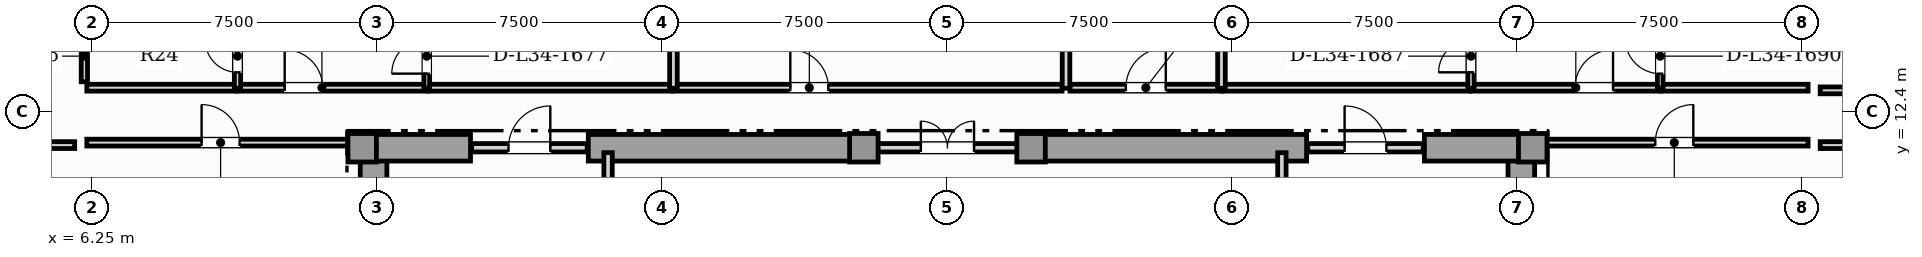
"""IFC4 building model, lengths in metres.
Left out: names, types, materials, properties, quantities, classifications, styles, units other than length and angle.
Written with IfcOpenShell. Run it as: python <this file> out.ifc"""

import sys

from ifc_helpers import new_model, si_unit, direction, frame, frame_2d, origin, origin_2d, place, context, subcontext, project, spatial, rectangle, extrude, element, fill, save


model = new_model("IFC4")
c1 = context("Model", 3, precision=1e-05, world=origin(), true_north=direction((0.0, 1.0)))
c2 = subcontext(c1, "Body", "Model", "MODEL_VIEW")
j1 = project(units=[si_unit("LENGTHUNIT", "METRE"), si_unit("PLANEANGLEUNIT", "RADIAN")], contexts=[c1])
p1 = place(None, origin())
s1 = spatial("IfcSite", under=j1, at=p1, CompositionType="ELEMENT")
p2 = place(p1, origin())
s2 = spatial("IfcBuilding", under=s1, at=p2, CompositionType="ELEMENT")
p3 = place(p2, frame((0.0, 0.0, 140.15)))
s3 = spatial("IfcBuildingStorey", under=s2, at=p3, CompositionType="ELEMENT", Elevation=140.15)
for number, where, z_axis, x_axis in (
    (1, (13.65, 0.92, 0.0), (0.0, 0.0, 1.0), (0.0, 1.0, 0.0)),
    (2, (43.85, 0.92, 0.0), (0.0, 0.0, 1.0), (0.0, 1.0, 0.0)),
):
    element("IfcWall", number, at=place(p3, frame(where, z_axis=z_axis, x_axis=x_axis)), inside=s3, PredefinedType="SHEAR", context=c2, shape_type="SweptSolid", body=[
        extrude(rectangle(XDim=10.53, YDim=0.7, at=frame_2d((5.265, 0.0))), origin(), (0.0, 0.0, 1.0), 4.83),
    ])
p4 = place(p3, frame((13.25, 11.45, 0.0), z_axis=(0.0, 0.0, 1.0), x_axis=(1.0, 0.0, 0.0)))
e3 = element("IfcWall", 3, at=p4, inside=s3, PredefinedType="SHEAR", context=c2, shape_type="SweptSolid", body=[
    extrude(rectangle(XDim=2.95, YDim=0.7, at=frame_2d((1.475, 0.0))), origin(), (0.0, 0.0, 1.0), 4.83),
])
for number, where, z_axis, x_axis in (
    (4, (19.3, 11.45, 0.0), (0.0, 0.0, 1.0), (1.0, 0.0, 0.0)),
    (5, (30.9, 11.45, 0.0), (0.0, 0.0, 1.0), (1.0, 0.0, 0.0)),
):
    element("IfcWall", number, at=place(p3, frame(where, z_axis=z_axis, x_axis=x_axis)), inside=s3, PredefinedType="SHEAR", context=c2, shape_type="SweptSolid", body=[
        extrude(rectangle(XDim=7.3, YDim=0.7, at=frame_2d((3.65, 0.0))), origin(), (0.0, 0.0, 1.0), 4.83),
    ])
p5 = place(p3, frame((41.3, 11.45, 0.0), z_axis=(0.0, 0.0, 1.0), x_axis=(1.0, 0.0, 0.0)))
e6 = element("IfcWall", 6, at=p5, inside=s3, PredefinedType="SHEAR", context=c2, shape_type="SweptSolid", body=[
    extrude(rectangle(XDim=2.95, YDim=0.7, at=frame_2d((1.475, 0.0))), origin(), (0.0, 0.0, 1.0), 4.83),
])
for number, where, z_axis, x_axis in (
    (7, (13.35, 11.45, 0.0), (0.0, 0.0, 1.0), (1.0, 0.0, 0.0)),
    (8, (44.15, 11.45, 0.0), (0.0, 0.0, 1.0), (1.0, 0.0, 0.0)),
    (9, (26.55, 11.45, 0.0), (0.0, 0.0, 1.0), (1.0, 0.0, 0.0)),
    (10, (30.95, 11.45, 0.0), (0.0, 0.0, 1.0), (1.0, 0.0, 0.0)),
):
    element("IfcColumn", number, at=place(p3, frame(where, z_axis=z_axis, x_axis=x_axis)), inside=s3, PredefinedType="COLUMN", context=c2, shape_type="SweptSolid", body=[
        extrude(rectangle(XDim=0.75, YDim=0.75, at=origin_2d()), origin(), (0.0, 0.0, 1.0), 5.05),
    ])
p6 = place(p3, frame((19.82, 8.52, 0.0), z_axis=(0.0, 0.0, 1.0), x_axis=(0.0, 1.0, 0.0)))
e11 = element("IfcWall", 11, at=p6, inside=s3, PredefinedType="SOLIDWALL", context=c2, shape_type="SweptSolid", body=[
    extrude(rectangle(XDim=2.8, YDim=0.22, at=frame_2d((1.4, 0.0))), origin(), (0.0, 0.0, 1.0), 4.286),
])
p7 = place(p6, frame((0.85, 0.0, 0.0)))
e12 = element("IfcOpeningElement", 12, at=p7, cuts=e11, PredefinedType="OPENING", context=c2, shape_type="SweptSolid", body=[
    extrude(rectangle(XDim=1.1, YDim=2.2, at=frame_2d((0.55, 1.1))), frame((0.0, 0.12, 0.0), z_axis=(0.0, -1.0, 0.0), x_axis=(1.0, 0.0, 0.0)), (0.0, 0.0, 1.0), 0.24),
])
p8 = place(p3, frame((37.55, 8.52, 0.0), z_axis=(0.0, 0.0, 1.0), x_axis=(0.0, 1.0, 0.0)))
e13 = element("IfcWall", 13, at=p8, inside=s3, PredefinedType="SOLIDWALL", context=c2, shape_type="SweptSolid", body=[
    extrude(rectangle(XDim=2.8, YDim=0.22, at=frame_2d((1.4, 0.0))), origin(), (0.0, 0.0, 1.0), 4.286),
])
p9 = place(p8, frame((0.85, 0.0, 0.0)))
e14 = element("IfcOpeningElement", 14, at=p9, cuts=e13, PredefinedType="OPENING", context=c2, shape_type="SweptSolid", body=[
    extrude(rectangle(XDim=1.1, YDim=2.2, at=frame_2d((0.55, 1.1))), frame((0.0, 0.12, 0.0), z_axis=(0.0, -1.0, 0.0), x_axis=(1.0, 0.0, 0.0)), (0.0, 0.0, 1.0), 0.24),
])
p10 = place(p3, frame((16.23, 11.45, 0.0), z_axis=(0.0, 0.0, 1.0), x_axis=(1.0, 0.0, 0.0)))
e15 = element("IfcWall", 15, at=p10, inside=s3, PredefinedType="SOLIDWALL", context=c2, shape_type="SweptSolid", body=[
    extrude(rectangle(XDim=3.04, YDim=0.22, at=frame_2d((1.52, 0.0))), origin(), (0.0, 0.0, 1.0), 4.83),
])
p11 = place(p10, frame((0.97, 0.0, 0.0)))
e16 = element("IfcOpeningElement", 16, at=p11, cuts=e15, PredefinedType="OPENING", context=c2, shape_type="SweptSolid", body=[
    extrude(rectangle(XDim=1.1, YDim=2.2, at=frame_2d((0.55, 1.1))), frame((0.0, 0.12, 0.0), z_axis=(0.0, -1.0, 0.0), x_axis=(1.0, 0.0, 0.0)), (0.0, 0.0, 1.0), 0.24),
])
p12 = place(p3, frame((26.63, 11.45, 0.0), z_axis=(0.0, 0.0, 1.0), x_axis=(1.0, 0.0, 0.0)))
e17 = element("IfcWall", 17, at=p12, inside=s3, PredefinedType="SOLIDWALL", context=c2, shape_type="SweptSolid", body=[
    extrude(rectangle(XDim=4.24, YDim=0.22, at=frame_2d((2.12, 0.0))), origin(), (0.0, 0.0, 1.0), 4.83),
])
p13 = place(p12, frame((1.42, 0.0, 0.0)))
e18 = element("IfcOpeningElement", 18, at=p13, cuts=e17, PredefinedType="OPENING", context=c2, shape_type="SweptSolid", body=[
    extrude(rectangle(XDim=1.4, YDim=2.2, at=frame_2d((0.7, 1.1))), frame((0.0, 0.12, 0.0), z_axis=(0.0, -1.0, 0.0), x_axis=(1.0, 0.0, 0.0)), (0.0, 0.0, 1.0), 0.24),
])
p14 = place(p3, frame((38.23, 11.45, 0.0), z_axis=(0.0, 0.0, 1.0), x_axis=(1.0, 0.0, 0.0)))
e19 = element("IfcWall", 19, at=p14, inside=s3, PredefinedType="SOLIDWALL", context=c2, shape_type="SweptSolid", body=[
    extrude(rectangle(XDim=3.04, YDim=0.22, at=frame_2d((1.52, 0.0))), origin(), (0.0, 0.0, 1.0), 4.83),
])
p15 = place(p14, frame((0.97, 0.0, 0.0)))
e20 = element("IfcOpeningElement", 20, at=p15, cuts=e19, PredefinedType="OPENING", context=c2, shape_type="SweptSolid", body=[
    extrude(rectangle(XDim=1.1, YDim=2.2, at=frame_2d((0.55, 1.1))), frame((0.0, 0.12, 0.0), z_axis=(0.0, -1.0, 0.0), x_axis=(1.0, 0.0, 0.0)), (0.0, 0.0, 1.0), 0.24),
])
p16 = place(p3, frame((6.105, 11.585, 0.0), z_axis=(0.0, 0.0, 1.0), x_axis=(1.0, 0.0, 0.0)))
e21 = element("IfcWall", 21, at=p16, inside=s3, PredefinedType="PARTITIONING", context=c2, shape_type="SweptSolid", body=[
    extrude(rectangle(XDim=7.04, YDim=0.18, at=frame_2d((3.52, 0.0))), origin(), (0.0, 0.0, 1.0), 4.83),
])
p17 = place(p16, frame((3.02, 0.0, 0.0)))
e22 = element("IfcOpeningElement", 22, at=p17, cuts=e21, PredefinedType="OPENING", context=c2, shape_type="SweptSolid", body=[
    extrude(rectangle(XDim=1.0, YDim=2.15, at=frame_2d((0.5, 1.075))), frame((0.0, 0.1, 0.0), z_axis=(0.0, -1.0, 0.0), x_axis=(1.0, 0.0, 0.0)), (0.0, 0.0, 1.0), 0.2),
])
p18 = place(p3, frame((44.355, 11.585, 0.0), z_axis=(0.0, 0.0, 1.0), x_axis=(1.0, 0.0, 0.0)))
e23 = element("IfcWall", 23, at=p18, inside=s3, PredefinedType="PARTITIONING", context=c2, shape_type="SweptSolid", body=[
    extrude(rectangle(XDim=7.04, YDim=0.18, at=frame_2d((3.52, 0.0))), origin(), (0.0, 0.0, 1.0), 4.83),
])
p19 = place(p18, frame((3.02, 0.0, 0.0)))
e24 = element("IfcOpeningElement", 24, at=p19, cuts=e23, PredefinedType="OPENING", context=c2, shape_type="SweptSolid", body=[
    extrude(rectangle(XDim=1.0, YDim=2.15, at=frame_2d((0.5, 1.075))), frame((0.0, 0.1, 0.0), z_axis=(0.0, -1.0, 0.0), x_axis=(1.0, 0.0, 0.0)), (0.0, 0.0, 1.0), 0.2),
])
p20 = place(p3, frame((21.535, 13.03, 0.0), z_axis=(0.0, 0.0, 1.0), x_axis=(1.0, 0.0, 0.0)))
e25 = element("IfcWall", 25, at=p20, inside=s3, PredefinedType="PARTITIONING", context=c2, shape_type="SweptSolid", body=[
    extrude(rectangle(XDim=10.23, YDim=0.18, at=frame_2d((5.115, 0.0))), origin(), (0.0, 0.0, 1.0), 4.83),
])
p21 = place(p20, frame((3.081, 0.0, 0.0)))
e26 = element("IfcOpeningElement", 26, at=p21, cuts=e25, PredefinedType="OPENING", context=c2, shape_type="SweptSolid", body=[
    extrude(rectangle(XDim=1.0, YDim=2.15, at=frame_2d((0.5, 1.075))), frame((0.0, 0.1, 0.0), z_axis=(0.0, -1.0, 0.0), x_axis=(1.0, 0.0, 0.0)), (0.0, 0.0, 1.0), 0.2),
])
p22 = place(p3, frame((31.975, 13.03, 0.0), z_axis=(0.0, 0.0, 1.0), x_axis=(1.0, 0.0, 0.0)))
e27 = element("IfcWall", 27, at=p22, inside=s3, PredefinedType="PARTITIONING", context=c2, shape_type="SweptSolid", body=[
    extrude(rectangle(XDim=3.99, YDim=0.18, at=frame_2d((1.995, 0.0))), origin(), (0.0, 0.0, 1.0), 4.83),
])
p23 = place(p22, frame((1.47, 0.0, 0.0)))
e28 = element("IfcOpeningElement", 28, at=p23, cuts=e27, PredefinedType="OPENING", context=c2, shape_type="SweptSolid", body=[
    extrude(rectangle(XDim=1.05, YDim=2.15, at=frame_2d((0.525, 1.075))), frame((0.0, 0.1, 0.0), z_axis=(0.0, -1.0, 0.0), x_axis=(1.0, 0.0, 0.0)), (0.0, 0.0, 1.0), 0.2),
])
p24 = place(p3, frame((10.065, 13.03, 0.0), z_axis=(0.0, 0.0, 1.0), x_axis=(1.0, 0.0, 0.0)))
e29 = element("IfcWall", 29, at=p24, inside=s3, PredefinedType="PARTITIONING", context=c2, shape_type="SweptSolid", body=[
    extrude(rectangle(XDim=4.99, YDim=0.18, at=frame_2d((2.495, 0.0))), origin(), (0.0, 0.0, 1.0), 4.83),
])
p25 = place(p24, frame((1.247, 0.0, 0.0)))
e30 = element("IfcOpeningElement", 30, at=p25, cuts=e29, PredefinedType="OPENING", context=c2, shape_type="SweptSolid", body=[
    extrude(rectangle(XDim=1.0, YDim=2.15, at=frame_2d((0.5, 1.075))), frame((0.0, 0.1, 0.0), z_axis=(0.0, -1.0, 0.0), x_axis=(1.0, 0.0, 0.0)), (0.0, 0.0, 1.0), 0.2),
])
p26 = place(p3, frame((6.105, 13.03, 0.0), z_axis=(0.0, 0.0, 1.0), x_axis=(1.0, 0.0, 0.0)))
e31 = element("IfcWall", 31, at=p26, inside=s3, PredefinedType="PARTITIONING", context=c2, shape_type="SweptSolid", body=[
    extrude(rectangle(XDim=3.93, YDim=0.18, at=frame_2d((1.965, 0.0))), origin(), (0.0, 0.0, 1.0), 4.83),
])
p27 = place(p3, frame((15.085, 13.03, 0.0), z_axis=(0.0, 0.0, 1.0), x_axis=(1.0, 0.0, 0.0)))
e32 = element("IfcWall", 32, at=p27, inside=s3, PredefinedType="PARTITIONING", context=c2, shape_type="SweptSolid", body=[
    extrude(rectangle(XDim=6.42, YDim=0.18, at=frame_2d((3.21, 0.0))), origin(), (0.0, 0.0, 1.0), 4.83),
])
p28 = place(p3, frame((42.52, 13.03, 0.0), z_axis=(0.0, 0.0, 1.0), x_axis=(1.0, 0.0, 0.0)))
e33 = element("IfcWall", 33, at=p28, inside=s3, PredefinedType="PARTITIONING", context=c2, shape_type="SweptSolid", body=[
    extrude(rectangle(XDim=4.99, YDim=0.18, at=frame_2d((2.495, 0.0))), origin(), (0.0, 0.0, 1.0), 4.83),
])
p29 = place(p28, frame((2.743, 0.0, 0.0)))
e34 = element("IfcOpeningElement", 34, at=p29, cuts=e33, PredefinedType="OPENING", context=c2, shape_type="SweptSolid", body=[
    extrude(rectangle(XDim=1.0, YDim=2.15, at=frame_2d((0.5, 1.075))), frame((0.0, 0.1, 0.0), z_axis=(0.0, -1.0, 0.0), x_axis=(1.0, 0.0, 0.0)), (0.0, 0.0, 1.0), 0.2),
])
p30 = place(p3, frame((35.995, 13.03, 0.0), z_axis=(0.0, 0.0, 1.0), x_axis=(1.0, 0.0, 0.0)))
e35 = element("IfcWall", 35, at=p30, inside=s3, PredefinedType="PARTITIONING", context=c2, shape_type="SweptSolid", body=[
    extrude(rectangle(XDim=6.495, YDim=0.18, at=frame_2d((3.248, 0.0))), origin(), (0.0, 0.0, 1.0), 4.83),
])
p31 = place(p3, frame((47.54, 13.03, 0.0), z_axis=(0.0, 0.0, 1.0), x_axis=(1.0, 0.0, 0.0)))
e36 = element("IfcWall", 36, at=p31, inside=s3, PredefinedType="PARTITIONING", context=c2, shape_type="SweptSolid", body=[
    extrude(rectangle(XDim=3.855, YDim=0.18, at=frame_2d((1.927, 0.0))), origin(), (0.0, 0.0, 1.0), 4.83),
])
p32 = place(p3, frame((31.87, 13.015, 0.0), z_axis=(0.0, 0.0, 1.0), x_axis=(0.0, 1.0, 0.0)))
e37 = element("IfcWall", 37, at=p32, inside=s3, PredefinedType="PARTITIONING", context=c2, shape_type="SweptSolid", body=[
    extrude(rectangle(XDim=4.54, YDim=0.2, at=frame_2d((2.27, 0.0))), origin(), (0.0, 0.0, 1.0), 4.83),
])
for number, where, z_axis, x_axis in (
    (38, (21.54, 13.015, 0.0), (0.0, 0.0, 1.0), (0.0, 1.0, 0.0)),
    (39, (35.96, 13.015, 0.0), (0.0, 0.0, 1.0), (0.0, 1.0, 0.0)),
):
    element("IfcWall", number, at=place(p3, frame(where, z_axis=z_axis, x_axis=x_axis)), inside=s3, PredefinedType="PARTITIONING", context=c2, shape_type="SweptSolid", body=[
        extrude(rectangle(XDim=1.69, YDim=0.2, at=frame_2d((0.845, 0.0))), origin(), (0.0, 0.0, 1.0), 4.83),
    ])
p33 = place(p3, frame((10.07, 13.015, 0.0), z_axis=(0.0, 0.0, 1.0), x_axis=(0.0, 1.0, 0.0)))
e40 = element("IfcWall", 40, at=p33, inside=s3, PredefinedType="PLUMBINGWALL", context=c2, shape_type="SweptSolid", body=[
    extrude(rectangle(XDim=1.69, YDim=0.165, at=frame_2d((0.845, 0.0))), origin(), (0.0, 0.0, 1.0), 4.377),
])
p34 = place(p33, frame((0.42, 0.0, 0.0)))
e41 = element("IfcOpeningElement", 41, at=p34, cuts=e40, PredefinedType="OPENING", context=c2, shape_type="SweptSolid", body=[
    extrude(rectangle(XDim=0.85, YDim=2.1, at=frame_2d((0.425, 1.05))), frame((0.0, 0.093, 0.0), z_axis=(0.0, -1.0, 0.0), x_axis=(1.0, 0.0, 0.0)), (0.0, 0.0, 1.0), 0.185),
])
p35 = place(p3, frame((15.05, 13.015, 0.0), z_axis=(0.0, 0.0, 1.0), x_axis=(0.0, 1.0, 0.0)))
e42 = element("IfcWall", 42, at=p35, inside=s3, PredefinedType="PARTITIONING", context=c2, shape_type="SweptSolid", body=[
    extrude(rectangle(XDim=1.69, YDim=0.15, at=frame_2d((0.845, 0.0))), origin(), (0.0, 0.0, 1.0), 4.83),
])
p36 = place(p35, frame((0.385, 0.0, 0.0)))
e43 = element("IfcOpeningElement", 43, at=p36, cuts=e42, PredefinedType="OPENING", context=c2, shape_type="SweptSolid", body=[
    extrude(rectangle(XDim=0.92, YDim=2.1, at=frame_2d((0.46, 1.05))), frame((0.0, 0.085, 0.0), z_axis=(0.0, -1.0, 0.0), x_axis=(1.0, 0.0, 0.0)), (0.0, 0.0, 1.0), 0.17),
])
p37 = place(p3, frame((42.525, 13.015, 0.0), z_axis=(0.0, 0.0, 1.0), x_axis=(0.0, 1.0, 0.0)))
e44 = element("IfcWall", 44, at=p37, inside=s3, PredefinedType="PLUMBINGWALL", context=c2, shape_type="SweptSolid", body=[
    extrude(rectangle(XDim=1.69, YDim=0.165, at=frame_2d((0.845, 0.0))), origin(), (0.0, 0.0, 1.0), 4.83),
])
p38 = place(p37, frame((0.42, 0.0, 0.0)))
e45 = element("IfcOpeningElement", 45, at=p38, cuts=e44, PredefinedType="OPENING", context=c2, shape_type="SweptSolid", body=[
    extrude(rectangle(XDim=0.85, YDim=2.1, at=frame_2d((0.425, 1.05))), frame((0.0, 0.093, 0.0), z_axis=(0.0, -1.0, 0.0), x_axis=(1.0, 0.0, 0.0)), (0.0, 0.0, 1.0), 0.185),
])
p39 = place(p3, frame((47.505, 13.015, 0.0), z_axis=(0.0, 0.0, 1.0), x_axis=(0.0, 1.0, 0.0)))
e46 = element("IfcWall", 46, at=p39, inside=s3, PredefinedType="PARTITIONING", context=c2, shape_type="SweptSolid", body=[
    extrude(rectangle(XDim=1.69, YDim=0.15, at=frame_2d((0.845, 0.0))), origin(), (0.0, 0.0, 1.0), 4.377),
])
p40 = place(p39, frame((0.385, 0.0, 0.0)))
e47 = element("IfcOpeningElement", 47, at=p40, cuts=e46, PredefinedType="OPENING", context=c2, shape_type="SweptSolid", body=[
    extrude(rectangle(XDim=0.92, YDim=2.1, at=frame_2d((0.46, 1.05))), frame((0.0, 0.085, 0.0), z_axis=(0.0, -1.0, 0.0), x_axis=(1.0, 0.0, 0.0)), (0.0, 0.0, 1.0), 0.17),
])
for number, where, z_axis, x_axis in (
    (48, (2.772, 11.52, 0.0), (0.0, 0.0, 1.0), (1.0, 0.0, 0.0)),
    (49, (51.714, 11.52, 0.0), (0.0, 0.0, 1.0), (1.0, 0.0, 0.0)),
):
    element("IfcWall", number, at=place(p3, frame(where, z_axis=z_axis, x_axis=x_axis)), inside=s3, PredefinedType="PARTITIONING", context=c2, shape_type="SweptSolid", body=[
        extrude(rectangle(XDim=3.013, YDim=0.18, at=frame_2d((1.507, 0.0))), origin(), (0.0, 0.0, 1.0), 4.83),
    ])
p41 = place(p3, frame((6.04, 13.186, 0.0), z_axis=(0.0, 0.0, 1.0), x_axis=(0.0, 1.0, 0.0)))
e50 = element("IfcWall", 50, at=p41, inside=s3, PredefinedType="PLUMBINGWALL", context=c2, shape_type="SweptSolid", body=[
    extrude(rectangle(XDim=1.349, YDim=0.165, at=frame_2d((0.674, 0.0))), origin(), (0.0, 0.0, 1.0), 4.83),
])
p42 = place(p3, frame((54.728, 12.96, 0.0), z_axis=(0.0, 0.0, 1.0), x_axis=(-1.0, 0.0, 0.0)))
e51 = element("IfcWall", 51, at=p42, inside=s3, PredefinedType="PARTITIONING", context=c2, shape_type="SweptSolid", body=[
    extrude(rectangle(XDim=3.014, YDim=0.18, at=frame_2d((1.507, 0.0))), origin(), (0.0, 0.0, 1.0), 4.83),
])
p43 = place(p11, origin())
e52 = element("IfcDoor", 52, at=p43, inside=s3, OperationType="SINGLE_SWING_RIGHT", PredefinedType="DOOR", context=c2, shape_type="SweptSolid", body=[
    extrude(rectangle(XDim=1.1, YDim=2.2, at=frame_2d((0.55, 1.1))), frame((0.0, 0.025, 0.0), z_axis=(0.0, -1.0, 0.0), x_axis=(1.0, 0.0, 0.0)), (0.0, 0.0, 1.0), 0.05),
])
fill(e16, e52)
p44 = place(p13, origin())
e53 = element("IfcDoor", 53, at=p44, inside=s3, OperationType="DOUBLE_DOOR_SINGLE_SWING", PredefinedType="DOOR", context=c2, shape_type="SweptSolid", body=[
    extrude(rectangle(XDim=1.4, YDim=2.2, at=frame_2d((0.7, 1.1))), frame((0.0, 0.025, 0.0), z_axis=(0.0, -1.0, 0.0), x_axis=(1.0, 0.0, 0.0)), (0.0, 0.0, 1.0), 0.05),
])
fill(e18, e53)
p45 = place(p15, origin())
e54 = element("IfcDoor", 54, at=p45, inside=s3, OperationType="SINGLE_SWING_LEFT", PredefinedType="DOOR", context=c2, shape_type="SweptSolid", body=[
    extrude(rectangle(XDim=1.1, YDim=2.2, at=frame_2d((0.55, 1.1))), frame((0.0, 0.025, 0.0), z_axis=(0.0, -1.0, 0.0), x_axis=(1.0, 0.0, 0.0)), (0.0, 0.0, 1.0), 0.05),
])
fill(e20, e54)
p46 = place(p17, origin())
e55 = element("IfcDoor", 55, at=p46, inside=s3, OperationType="SINGLE_SWING_LEFT", PredefinedType="DOOR", context=c2, shape_type="SweptSolid", body=[
    extrude(rectangle(XDim=1.0, YDim=2.15, at=frame_2d((0.5, 1.075))), frame((0.0, 0.025, 0.0), z_axis=(0.0, -1.0, 0.0), x_axis=(1.0, 0.0, 0.0)), (0.0, 0.0, 1.0), 0.05),
])
fill(e22, e55)
p47 = place(p19, origin())
e56 = element("IfcDoor", 56, at=p47, inside=s3, OperationType="SINGLE_SWING_RIGHT", PredefinedType="DOOR", context=c2, shape_type="SweptSolid", body=[
    extrude(rectangle(XDim=1.0, YDim=2.15, at=frame_2d((0.5, 1.075))), frame((0.0, 0.025, 0.0), z_axis=(0.0, -1.0, 0.0), x_axis=(1.0, 0.0, 0.0)), (0.0, 0.0, 1.0), 0.05),
])
fill(e24, e56)
p48 = place(p21, origin())
e57 = element("IfcDoor", 57, at=p48, inside=s3, OperationType="SINGLE_SWING_LEFT", PredefinedType="DOOR", context=c2, shape_type="SweptSolid", body=[
    extrude(rectangle(XDim=1.0, YDim=2.15, at=frame_2d((0.5, 1.075))), frame((0.0, 0.025, 0.0), z_axis=(0.0, -1.0, 0.0), x_axis=(1.0, 0.0, 0.0)), (0.0, 0.0, 1.0), 0.05),
])
fill(e26, e57)
p49 = place(p23, origin())
e58 = element("IfcDoor", 58, at=p49, inside=s3, OperationType="SINGLE_SWING_RIGHT", PredefinedType="DOOR", context=c2, shape_type="SweptSolid", body=[
    extrude(rectangle(XDim=1.05, YDim=2.15, at=frame_2d((0.525, 1.075))), frame((0.0, 0.025, 0.0), z_axis=(0.0, -1.0, 0.0), x_axis=(1.0, 0.0, 0.0)), (0.0, 0.0, 1.0), 0.05),
])
fill(e28, e58)
p50 = place(p25, origin())
e59 = element("IfcDoor", 59, at=p50, inside=s3, OperationType="SINGLE_SWING_LEFT", PredefinedType="DOOR", context=c2, shape_type="SweptSolid", body=[
    extrude(rectangle(XDim=1.0, YDim=2.15, at=frame_2d((0.5, 1.075))), frame((0.0, 0.025, 0.0), z_axis=(0.0, -1.0, 0.0), x_axis=(1.0, 0.0, 0.0)), (0.0, 0.0, 1.0), 0.05),
])
fill(e30, e59)
p51 = place(p29, origin())
e60 = element("IfcDoor", 60, at=p51, inside=s3, OperationType="SINGLE_SWING_RIGHT", PredefinedType="DOOR", context=c2, shape_type="SweptSolid", body=[
    extrude(rectangle(XDim=1.0, YDim=2.15, at=frame_2d((0.5, 1.075))), frame((0.0, 0.025, 0.0), z_axis=(0.0, -1.0, 0.0), x_axis=(1.0, 0.0, 0.0)), (0.0, 0.0, 1.0), 0.05),
])
fill(e34, e60)
p52 = place(p34, origin())
e61 = element("IfcDoor", 61, at=p52, inside=s3, OperationType="SINGLE_SWING_RIGHT", PredefinedType="DOOR", context=c2, shape_type="SweptSolid", body=[
    extrude(rectangle(XDim=0.85, YDim=2.1, at=frame_2d((0.425, 1.05))), frame((0.0, 0.025, 0.0), z_axis=(0.0, -1.0, 0.0), x_axis=(1.0, 0.0, 0.0)), (0.0, 0.0, 1.0), 0.05),
])
fill(e41, e61)
p53 = place(p36, origin())
e62 = element("IfcDoor", 62, at=p53, inside=s3, OperationType="SINGLE_SWING_LEFT", PredefinedType="DOOR", context=c2, shape_type="SweptSolid", body=[
    extrude(rectangle(XDim=0.92, YDim=2.1, at=frame_2d((0.46, 1.05))), frame((0.0, 0.025, 0.0), z_axis=(0.0, -1.0, 0.0), x_axis=(1.0, 0.0, 0.0)), (0.0, 0.0, 1.0), 0.05),
])
fill(e43, e62)
p54 = place(p38, origin())
e63 = element("IfcDoor", 63, at=p54, inside=s3, OperationType="SINGLE_SWING_LEFT", PredefinedType="DOOR", context=c2, shape_type="SweptSolid", body=[
    extrude(rectangle(XDim=0.85, YDim=2.1, at=frame_2d((0.425, 1.05))), frame((0.0, 0.025, 0.0), z_axis=(0.0, -1.0, 0.0), x_axis=(1.0, 0.0, 0.0)), (0.0, 0.0, 1.0), 0.05),
])
fill(e45, e63)
p55 = place(p40, origin())
e64 = element("IfcDoor", 64, at=p55, inside=s3, OperationType="SINGLE_SWING_RIGHT", PredefinedType="DOOR", context=c2, shape_type="SweptSolid", body=[
    extrude(rectangle(XDim=0.92, YDim=2.1, at=frame_2d((0.46, 1.05))), frame((0.0, 0.025, 0.0), z_axis=(0.0, -1.0, 0.0), x_axis=(1.0, 0.0, 0.0)), (0.0, 0.0, 1.0), 0.05),
])
fill(e47, e64)
save(model, sys.argv[1])
